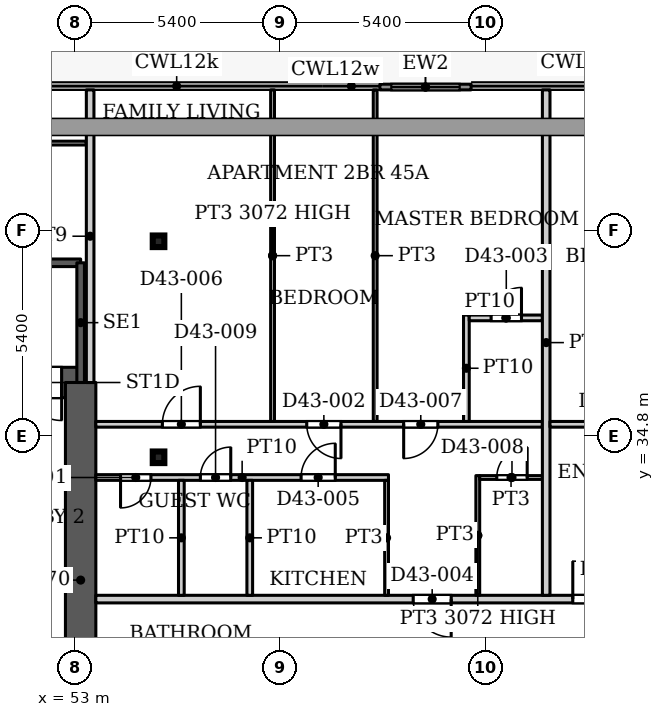
"""IFC4 building model, lengths in metres.
Left out: names, types, materials, properties, quantities, classifications, styles, units other than length and angle.
Written with IfcOpenShell. Run it as: python <this file> out.ifc"""

import sys

from ifc_helpers import new_model, si_unit, direction, frame, frame_2d, origin, origin_2d, place, context, subcontext, project, spatial, rectangle, hollow_rectangle, extrude, source, transform, mapped, element, fill, save


model = new_model("IFC4")
c1 = context("Model", 3, precision=1e-05, world=origin(), true_north=direction((0.0, 1.0)))
c2 = subcontext(c1, "Body", "Model", "MODEL_VIEW")
j1 = project(units=[si_unit("LENGTHUNIT", "METRE"), si_unit("PLANEANGLEUNIT", "RADIAN")], contexts=[c1])
p1 = place(None, origin())
s1 = spatial("IfcSite", under=j1, at=p1, CompositionType="ELEMENT")
p2 = place(p1, origin())
s2 = spatial("IfcBuilding", under=s1, at=p2, CompositionType="ELEMENT")
p3 = place(p2, frame((0.0, 0.0, 191.6)))
s3 = spatial("IfcBuildingStorey", under=s2, at=p3, CompositionType="ELEMENT", Elevation=191.6)
for number, where, z_axis, x_axis in (
    (1, (55.2, 34.232, 0.0), (0.0, 0.0, 1.0), (1.0, 0.0, 0.0)),
    (2, (55.2, 39.916, 0.0), (0.0, 0.0, 1.0), (1.0, 0.0, 0.0)),
):
    element("IfcColumn", number, at=place(p3, frame(where, z_axis=z_axis, x_axis=x_axis)), inside=s3, PredefinedType="COLUMN", context=c2, shape_type="SweptSolid", body=[
        extrude(hollow_rectangle(XDim=0.305, YDim=0.305, WallThickness=0.016, InnerFilletRadius=0.016, OuterFilletRadius=0.032, at=origin_2d()), origin(), (0.0, 0.0, 1.0), 3.9),
    ])
p4 = place(p3, frame((34.75, 36.2, 0.0), z_axis=(0.0, 0.0, 1.0), x_axis=(1.0, 0.0, 0.0)))
e3 = element("IfcWall", 3, at=p4, inside=s3, PredefinedType="SHEAR", context=c2, shape_type="SweptSolid", body=[
    extrude(rectangle(XDim=18.4, YDim=0.8, at=frame_2d((9.2, 0.0))), origin(), (0.0, 0.0, 1.0), 3.9),
])
p5 = place(p4, frame((16.9, 0.0, 0.0)))
e4 = element("IfcOpeningElement", 4, at=p5, cuts=e3, PredefinedType="OPENING", context=c2, shape_type="SweptSolid", body=[
    extrude(rectangle(XDim=1.0, YDim=2.2, at=frame_2d((0.5, 1.1))), frame((0.0, 0.41, 0.0), z_axis=(0.0, -1.0, 0.0), x_axis=(1.0, 0.0, 0.0)), (0.0, 0.0, 1.0), 0.82),
])
p6 = place(p3, frame((53.15, 25.8, 0.0), z_axis=(0.0, 0.0, 1.0), x_axis=(0.0, 1.0, 0.0)))
e5 = element("IfcWall", 5, at=p6, inside=s3, PredefinedType="SHEAR", context=c2, shape_type="SweptSolid", body=[
    extrude(rectangle(XDim=10.4, YDim=0.8, at=frame_2d((5.2, 0.0))), origin(), (0.0, 0.0, 1.0), 3.9),
])
p7 = place(p3, frame((61.024, 43.975, 0.0), z_axis=(0.0, 0.0, 1.0), x_axis=(1.0, 0.0, 0.0)))
e6 = element("IfcWall", 6, at=p7, inside=s3, PredefinedType="SOLIDWALL", context=c2, shape_type="SweptSolid", body=[
    extrude(rectangle(XDim=2.4, YDim=0.15, at=frame_2d((1.2, 0.0))), origin(), (0.0, 0.0, 1.0), 3.75),
])
p8 = place(p7, frame((0.3, 0.0, 0.0)))
e7 = element("IfcOpeningElement", 7, at=p8, cuts=e6, PredefinedType="OPENING", context=c2, shape_type="SweptSolid", body=[
    extrude(rectangle(XDim=1.8, YDim=2.4, at=frame_2d((0.9, 1.2))), frame((0.0, 0.085, 0.0), z_axis=(0.0, -1.0, 0.0), x_axis=(1.0, 0.0, 0.0)), (0.0, 0.0, 1.0), 0.17),
])
p9 = place(p3, frame((43.99, 39.35, 0.0), z_axis=(0.0, 0.0, 1.0), x_axis=(1.0, 0.0, 0.0)))
e8 = element("IfcWall", 8, at=p9, inside=s3, PredefinedType="SHEAR", context=c2, shape_type="SweptSolid", body=[
    extrude(rectangle(XDim=9.16, YDim=0.2, at=frame_2d((4.58, 0.0))), origin(), (0.0, 0.0, 1.0), 3.9),
])
p10 = place(p3, frame((53.15, 36.2, 0.0), z_axis=(0.0, 0.0, 1.0), x_axis=(0.0, 1.0, 0.0)))
e9 = element("IfcWall", 9, at=p10, inside=s3, PredefinedType="SHEAR", context=c2, shape_type="SweptSolid", body=[
    extrude(rectangle(XDim=3.15, YDim=0.2, at=frame_2d((1.575, 0.0))), origin(), (0.0, 0.0, 1.0), 3.9),
])
p11 = place(p3, frame((38.399, 42.5, 0.0), z_axis=(0.0, 0.0, 1.0), x_axis=(1.0, 0.0, 0.0)))
e10 = element("IfcWall", 10, at=p11, inside=s3, PredefinedType="PARTITIONING", context=c2, shape_type="SweptSolid", body=[
    extrude(rectangle(XDim=14.901, YDim=0.1, at=frame_2d((7.451, 0.0))), origin(), (0.0, 0.0, 1.0), 3.6),
])
p12 = place(p11, frame((6.801, 0.0, 0.0)))
e11 = element("IfcOpeningElement", 11, at=p12, cuts=e10, PredefinedType="OPENING", context=c2, shape_type="SweptSolid", body=[
    extrude(rectangle(XDim=1.0, YDim=2.1, at=frame_2d((0.5, 1.05))), frame((0.0, 0.06, 0.0), z_axis=(0.0, -1.0, 0.0), x_axis=(1.0, 0.0, 0.0)), (0.0, 0.0, 1.0), 0.12),
])
p13 = place(p3, frame((53.4, 36.199, 0.0), z_axis=(0.0, 0.0, 1.0), x_axis=(0.0, 1.0, 0.0)))
e12 = element("IfcWall", 12, at=p13, inside=s3, PredefinedType="PARTITIONING", context=c2, shape_type="SweptSolid", body=[
    extrude(rectangle(XDim=7.701, YDim=0.2, at=frame_2d((3.851, 0.0))), origin(), (0.0, 0.0, 1.0), 3.6),
])
p14 = place(p3, frame((53.549, 30.5, 0.0), z_axis=(0.0, 0.0, 1.0), x_axis=(1.0, 0.0, 0.0)))
e13 = element("IfcWall", 13, at=p14, inside=s3, PredefinedType="PARTITIONING", context=c2, shape_type="SweptSolid", body=[
    extrude(rectangle(XDim=44.551, YDim=0.2, at=frame_2d((22.275, 0.0))), origin(), (0.0, 0.0, 1.0), 3.6),
])
p15 = place(p14, frame((8.351, 0.0, 0.0)))
e14 = element("IfcOpeningElement", 14, at=p15, cuts=e13, PredefinedType="OPENING", context=c2, shape_type="SweptSolid", body=[
    extrude(rectangle(XDim=1.0, YDim=2.1, at=frame_2d((0.5, 1.05))), frame((0.0, 0.11, 0.0), z_axis=(0.0, -1.0, 0.0), x_axis=(1.0, 0.0, 0.0)), (0.0, 0.0, 1.0), 0.22),
])
p16 = place(p14, frame((12.551, 0.0, 0.0)))
e15 = element("IfcOpeningElement", 15, at=p16, cuts=e13, PredefinedType="OPENING", context=c2, shape_type="SweptSolid", body=[
    extrude(rectangle(XDim=1.0, YDim=2.1, at=frame_2d((0.5, 1.05))), frame((0.0, 0.11, 0.0), z_axis=(0.0, -1.0, 0.0), x_axis=(1.0, 0.0, 0.0)), (0.0, 0.0, 1.0), 0.22),
])
p17 = place(p14, frame((28.751, 0.0, 0.0)))
e16 = element("IfcOpeningElement", 16, at=p17, cuts=e13, PredefinedType="OPENING", context=c2, shape_type="SweptSolid", body=[
    extrude(rectangle(XDim=1.0, YDim=2.1, at=frame_2d((0.5, 1.05))), frame((0.0, 0.11, 0.0), z_axis=(0.0, -1.0, 0.0), x_axis=(1.0, 0.0, 0.0)), (0.0, 0.0, 1.0), 0.22),
])
p18 = place(p14, frame((40.751, 0.0, 0.0)))
e17 = element("IfcOpeningElement", 17, at=p18, cuts=e13, PredefinedType="OPENING", context=c2, shape_type="SweptSolid", body=[
    extrude(rectangle(XDim=1.0, YDim=2.1, at=frame_2d((0.5, 1.05))), frame((0.0, 0.11, 0.0), z_axis=(0.0, -1.0, 0.0), x_axis=(1.0, 0.0, 0.0)), (0.0, 0.0, 1.0), 0.22),
])
p19 = place(p3, frame((53.549, 33.7, 0.0), z_axis=(0.0, 0.0, 1.0), x_axis=(1.0, 0.0, 0.0)))
e18 = element("IfcWall", 18, at=p19, inside=s3, PredefinedType="PARTITIONING", context=c2, shape_type="SweptSolid", body=[
    extrude(rectangle(XDim=7.701, YDim=0.15, at=frame_2d((3.851, 0.0))), origin(), (0.0, 0.0, 1.0), 3.6),
])
p20 = place(p19, frame((0.651, 0.0, 0.0)))
e19 = element("IfcOpeningElement", 19, at=p20, cuts=e18, PredefinedType="OPENING", context=c2, shape_type="SweptSolid", body=[
    extrude(rectangle(XDim=0.8, YDim=2.1, at=frame_2d((0.4, 1.05))), frame((0.0, 0.085, 0.0), z_axis=(0.0, -1.0, 0.0), x_axis=(1.0, 0.0, 0.0)), (0.0, 0.0, 1.0), 0.17),
])
p21 = place(p19, frame((5.401, 0.0, 0.0)))
e20 = element("IfcOpeningElement", 20, at=p21, cuts=e18, PredefinedType="OPENING", context=c2, shape_type="SweptSolid", body=[
    extrude(rectangle(XDim=0.9, YDim=2.1, at=frame_2d((0.45, 1.05))), frame((0.0, 0.085, 0.0), z_axis=(0.0, -1.0, 0.0), x_axis=(1.0, 0.0, 0.0)), (0.0, 0.0, 1.0), 0.17),
])
p22 = place(p19, frame((2.751, 0.0, 0.0)))
e21 = element("IfcOpeningElement", 21, at=p22, cuts=e18, PredefinedType="OPENING", context=c2, shape_type="SweptSolid", body=[
    extrude(rectangle(XDim=0.8, YDim=2.1, at=frame_2d((0.4, 1.05))), frame((0.0, 0.085, 0.0), z_axis=(0.0, -1.0, 0.0), x_axis=(1.0, 0.0, 0.0)), (0.0, 0.0, 1.0), 0.17),
])
p23 = place(p3, frame((53.549, 35.1, 0.0), z_axis=(0.0, 0.0, 1.0), x_axis=(1.0, 0.0, 0.0)))
e22 = element("IfcWall", 22, at=p23, inside=s3, PredefinedType="PARTITIONING", context=c2, shape_type="SweptSolid", body=[
    extrude(rectangle(XDim=11.751, YDim=0.15, at=frame_2d((5.875, 0.0))), origin(), (0.0, 0.0, 1.0), 3.6),
])
p24 = place(p23, frame((5.551, 0.0, 0.0)))
e23 = element("IfcOpeningElement", 23, at=p24, cuts=e22, PredefinedType="OPENING", context=c2, shape_type="SweptSolid", body=[
    extrude(rectangle(XDim=0.9, YDim=2.1, at=frame_2d((0.45, 1.05))), frame((0.0, 0.085, 0.0), z_axis=(0.0, -1.0, 0.0), x_axis=(1.0, 0.0, 0.0)), (0.0, 0.0, 1.0), 0.17),
])
p25 = place(p23, frame((1.751, 0.0, 0.0)))
e24 = element("IfcOpeningElement", 24, at=p25, cuts=e22, PredefinedType="OPENING", context=c2, shape_type="SweptSolid", body=[
    extrude(rectangle(XDim=1.0, YDim=2.1, at=frame_2d((0.5, 1.05))), frame((0.0, 0.085, 0.0), z_axis=(0.0, -1.0, 0.0), x_axis=(1.0, 0.0, 0.0)), (0.0, 0.0, 1.0), 0.17),
])
p26 = place(p23, frame((8.101, 0.0, 0.0)))
e25 = element("IfcOpeningElement", 25, at=p26, cuts=e22, PredefinedType="OPENING", context=c2, shape_type="SweptSolid", body=[
    extrude(rectangle(XDim=0.9, YDim=2.1, at=frame_2d((0.45, 1.05))), frame((0.0, 0.085, 0.0), z_axis=(0.0, -1.0, 0.0), x_axis=(1.0, 0.0, 0.0)), (0.0, 0.0, 1.0), 0.17),
])
for number, where, z_axis, x_axis in (
    (26, (55.8, 30.6, 0.0), (0.0, 0.0, 1.0), (0.0, 1.0, 0.0)),
    (27, (57.6, 30.6, 0.0), (0.0, 0.0, 1.0), (0.0, 1.0, 0.0)),
):
    element("IfcWall", number, at=place(p3, frame(where, z_axis=z_axis, x_axis=x_axis)), inside=s3, PredefinedType="PARTITIONING", context=c2, shape_type="SweptSolid", body=[
        extrude(rectangle(XDim=3.025, YDim=0.15, at=frame_2d((1.512, 0.0))), origin(), (0.0, 0.0, 1.0), 3.6),
    ])
p27 = place(p3, frame((58.2, 35.175, 0.0), z_axis=(0.0, 0.0, 1.0), x_axis=(0.0, 1.0, 0.0)))
e28 = element("IfcWall", 28, at=p27, inside=s3, PredefinedType="PARTITIONING", context=c2, shape_type="SweptSolid", body=[
    extrude(rectangle(XDim=8.725, YDim=0.1, at=frame_2d((4.362, 0.0))), origin(), (0.0, 0.0, 1.0), 3.072),
])
p28 = place(p3, frame((60.9, 35.175, 0.0), z_axis=(0.0, 0.0, 1.0), x_axis=(0.0, 1.0, 0.0)))
e29 = element("IfcWall", 29, at=p28, inside=s3, PredefinedType="PARTITIONING", context=c2, shape_type="SweptSolid", body=[
    extrude(rectangle(XDim=8.725, YDim=0.1, at=frame_2d((4.362, 0.0))), origin(), (0.0, 0.0, 1.0), 3.6),
])
p29 = place(p3, frame((61.2, 30.6, 0.0), z_axis=(0.0, 0.0, 1.0), x_axis=(0.0, 1.0, 0.0)))
e30 = element("IfcWall", 30, at=p29, inside=s3, PredefinedType="PARTITIONING", context=c2, shape_type="SweptSolid", body=[
    extrude(rectangle(XDim=3.025, YDim=0.1, at=frame_2d((1.512, 0.0))), origin(), (0.0, 0.0, 1.0), 3.6),
])
p30 = place(p3, frame((63.3, 35.175, 0.0), z_axis=(0.0, 0.0, 1.0), x_axis=(0.0, 1.0, 0.0)))
e31 = element("IfcWall", 31, at=p30, inside=s3, PredefinedType="PARTITIONING", context=c2, shape_type="SweptSolid", body=[
    extrude(rectangle(XDim=2.8, YDim=0.15, at=frame_2d((1.4, 0.0))), origin(), (0.0, 0.0, 1.0), 3.6),
])
p31 = place(p3, frame((63.375, 37.9, 0.0), z_axis=(0.0, 0.0, 1.0), x_axis=(1.0, 0.0, 0.0)))
e32 = element("IfcWall", 32, at=p31, inside=s3, PredefinedType="PARTITIONING", context=c2, shape_type="SweptSolid", body=[
    extrude(rectangle(XDim=1.925, YDim=0.15, at=frame_2d((0.962, 0.0))), origin(), (0.0, 0.0, 1.0), 3.6),
])
p32 = place(p31, frame((0.575, 0.0, 0.0)))
e33 = element("IfcOpeningElement", 33, at=p32, cuts=e32, PredefinedType="OPENING", context=c2, shape_type="SweptSolid", body=[
    extrude(rectangle(XDim=0.8, YDim=2.1, at=frame_2d((0.4, 1.05))), frame((0.0, 0.085, 0.0), z_axis=(0.0, -1.0, 0.0), x_axis=(1.0, 0.0, 0.0)), (0.0, 0.0, 1.0), 0.17),
])
p33 = place(p3, frame((63.6, 30.6, 0.0), z_axis=(0.0, 0.0, 1.0), x_axis=(0.0, 1.0, 0.0)))
e34 = element("IfcWall", 34, at=p33, inside=s3, PredefinedType="PARTITIONING", context=c2, shape_type="SweptSolid", body=[
    extrude(rectangle(XDim=3.15, YDim=0.1, at=frame_2d((1.575, 0.0))), origin(), (0.0, 0.0, 1.0), 3.072),
])
p34 = place(p3, frame((63.65, 33.7, 0.0), z_axis=(0.0, 0.0, 1.0), x_axis=(1.0, 0.0, 0.0)))
e35 = element("IfcWall", 35, at=p34, inside=s3, PredefinedType="PARTITIONING", context=c2, shape_type="SweptSolid", body=[
    extrude(rectangle(XDim=1.65, YDim=0.1, at=frame_2d((0.825, 0.0))), origin(), (0.0, 0.0, 1.0), 3.6),
])
p35 = place(p34, frame((0.45, 0.0, 0.0)))
e36 = element("IfcOpeningElement", 36, at=p35, cuts=e35, PredefinedType="OPENING", context=c2, shape_type="SweptSolid", body=[
    extrude(rectangle(XDim=0.8, YDim=2.1, at=frame_2d((0.4, 1.05))), frame((0.0, 0.06, 0.0), z_axis=(0.0, -1.0, 0.0), x_axis=(1.0, 0.0, 0.0)), (0.0, 0.0, 1.0), 0.12),
])
p36 = place(p3, frame((65.4, 30.6, 0.0), z_axis=(0.0, 0.0, 1.0), x_axis=(0.0, 1.0, 0.0)))
e37 = element("IfcWall", 37, at=p36, inside=s3, PredefinedType="PARTITIONING", context=c2, shape_type="SweptSolid", body=[
    extrude(rectangle(XDim=13.3, YDim=0.2, at=frame_2d((6.65, 0.0))), origin(), (0.0, 0.0, 1.0), 3.6),
])
p37 = place(p3, frame((65.5, 35.1, 0.0), z_axis=(0.0, 0.0, 1.0), x_axis=(1.0, 0.0, 0.0)))
e38 = element("IfcWall", 38, at=p37, inside=s3, PredefinedType="PARTITIONING", context=c2, shape_type="SweptSolid", body=[
    extrude(rectangle(XDim=13.3, YDim=0.15, at=frame_2d((6.65, 0.0))), origin(), (0.0, 0.0, 1.0), 3.6),
])
p38 = place(p37, frame((1.4, 0.0, 0.0)))
e39 = element("IfcOpeningElement", 39, at=p38, cuts=e38, PredefinedType="OPENING", context=c2, shape_type="SweptSolid", body=[
    extrude(rectangle(XDim=0.9, YDim=2.1, at=frame_2d((0.45, 1.05))), frame((0.0, 0.085, 0.0), z_axis=(0.0, -1.0, 0.0), x_axis=(1.0, 0.0, 0.0)), (0.0, 0.0, 1.0), 0.17),
])
p39 = place(p37, frame((10.5, 0.0, 0.0)))
e40 = element("IfcOpeningElement", 40, at=p39, cuts=e38, PredefinedType="OPENING", context=c2, shape_type="SweptSolid", body=[
    extrude(rectangle(XDim=1.0, YDim=2.1, at=frame_2d((0.5, 1.05))), frame((0.0, 0.085, 0.0), z_axis=(0.0, -1.0, 0.0), x_axis=(1.0, 0.0, 0.0)), (0.0, 0.0, 1.0), 0.17),
])
p40 = place(p37, frame((6.8, 0.0, 0.0)))
e41 = element("IfcOpeningElement", 41, at=p40, cuts=e38, PredefinedType="OPENING", context=c2, shape_type="SweptSolid", body=[
    extrude(rectangle(XDim=0.9, YDim=2.1, at=frame_2d((0.45, 1.05))), frame((0.0, 0.085, 0.0), z_axis=(0.0, -1.0, 0.0), x_axis=(1.0, 0.0, 0.0)), (0.0, 0.0, 1.0), 0.17),
])
m1 = source(origin(), c2, "Body", "SweptSolid", [
    extrude(rectangle(XDim=1.8, YDim=2.4, at=frame_2d((0.9, 1.2))), frame((0.0, 0.025, 0.0), z_axis=(0.0, -1.0, 0.0), x_axis=(1.0, 0.0, 0.0)), (0.0, 0.0, 1.0), 0.05),
])
p41 = place(p8, origin())
e42 = element("IfcDoor", 42, at=p41, inside=s3, OperationType="SLIDING_TO_LEFT", PredefinedType="DOOR", context=c2, shape_type="MappedRepresentation", body=[
    mapped(m1, transform((0.0, 0.0, 0.0), x_axis=(1.0, 0.0, 0.0), y_axis=(0.0, 1.0, 0.0), z_axis=(0.0, 0.0, 1.0), scale=1.0)),
])
fill(e7, e42)
m2 = source(origin(), c2, "Body", "SweptSolid", [
    extrude(rectangle(XDim=1.0, YDim=2.2, at=frame_2d((0.5, 1.1))), frame((0.0, 0.025, 0.0), z_axis=(0.0, -1.0, 0.0), x_axis=(1.0, 0.0, 0.0)), (0.0, 0.0, 1.0), 0.05),
])
p42 = place(p5, origin())
e43 = element("IfcDoor", 43, at=p42, inside=s3, OperationType="SINGLE_SWING_RIGHT", PredefinedType="DOOR", context=c2, shape_type="MappedRepresentation", body=[
    mapped(m2, transform((0.0, 0.0, 0.0), x_axis=(1.0, 0.0, 0.0), y_axis=(0.0, 1.0, 0.0), z_axis=(0.0, 0.0, 1.0), scale=1.0)),
])
fill(e4, e43)
m3 = source(origin(), c2, "Body", "SweptSolid", [
    extrude(rectangle(XDim=0.8, YDim=2.1, at=frame_2d((0.4, 1.05))), frame((0.0, 0.025, 0.0), z_axis=(0.0, -1.0, 0.0), x_axis=(1.0, 0.0, 0.0)), (0.0, 0.0, 1.0), 0.05),
])
p43 = place(p20, origin())
e44 = element("IfcDoor", 44, at=p43, inside=s3, OperationType="SINGLE_SWING_RIGHT", PredefinedType="DOOR", context=c2, shape_type="MappedRepresentation", body=[
    mapped(m3, transform((0.0, 0.0, 0.0), x_axis=(1.0, 0.0, 0.0), y_axis=(0.0, 1.0, 0.0), z_axis=(0.0, 0.0, 1.0), scale=1.0)),
])
fill(e19, e44)
m4 = source(origin(), c2, "Body", "SweptSolid", [
    extrude(rectangle(XDim=0.9, YDim=2.1, at=frame_2d((0.45, 1.05))), frame((0.0, 0.025, 0.0), z_axis=(0.0, -1.0, 0.0), x_axis=(1.0, 0.0, 0.0)), (0.0, 0.0, 1.0), 0.05),
])
p44 = place(p24, origin())
e45 = element("IfcDoor", 45, at=p44, inside=s3, OperationType="SINGLE_SWING_RIGHT", PredefinedType="DOOR", context=c2, shape_type="MappedRepresentation", body=[
    mapped(m4, transform((0.0, 0.0, 0.0), x_axis=(1.0, 0.0, 0.0), y_axis=(0.0, 1.0, 0.0), z_axis=(0.0, 0.0, 1.0), scale=1.0)),
])
fill(e23, e45)
p45 = place(p32, origin())
e46 = element("IfcDoor", 46, at=p45, inside=s3, OperationType="SINGLE_SWING_LEFT", PredefinedType="DOOR", context=c2, shape_type="MappedRepresentation", body=[
    mapped(m3, transform((0.0, 0.0, 0.0), x_axis=(1.0, 0.0, 0.0), y_axis=(0.0, 1.0, 0.0), z_axis=(0.0, 0.0, 1.0), scale=1.0)),
])
fill(e33, e46)
m5 = source(origin(), c2, "Body", "SweptSolid", [
    extrude(rectangle(XDim=1.0, YDim=2.1, at=frame_2d((0.5, 1.05))), frame((0.0, 0.025, 0.0), z_axis=(0.0, -1.0, 0.0), x_axis=(1.0, 0.0, 0.0)), (0.0, 0.0, 1.0), 0.05),
])
p46 = place(p15, origin())
e47 = element("IfcDoor", 47, at=p46, inside=s3, OperationType="SINGLE_SWING_RIGHT", PredefinedType="DOOR", context=c2, shape_type="MappedRepresentation", body=[
    mapped(m5, transform((0.0, 0.0, 0.0), x_axis=(1.0, 0.0, 0.0), y_axis=(0.0, 1.0, 0.0), z_axis=(0.0, 0.0, 1.0), scale=1.0)),
])
fill(e14, e47)
p47 = place(p21, origin())
e48 = element("IfcDoor", 48, at=p47, inside=s3, OperationType="SINGLE_SWING_LEFT", PredefinedType="DOOR", context=c2, shape_type="MappedRepresentation", body=[
    mapped(m4, transform((0.0, 0.0, 0.0), x_axis=(1.0, 0.0, 0.0), y_axis=(0.0, 1.0, 0.0), z_axis=(0.0, 0.0, 1.0), scale=1.0)),
])
fill(e20, e48)
m6 = source(origin(), c2, "Body", "SweptSolid", [
    extrude(rectangle(XDim=1.0, YDim=2.1, at=frame_2d((0.5, 1.05))), frame((0.0, 0.025, 0.0), z_axis=(0.0, -1.0, 0.0), x_axis=(1.0, 0.0, 0.0)), (0.0, 0.0, 1.0), 0.05),
])
p48 = place(p25, origin())
e49 = element("IfcDoor", 49, at=p48, inside=s3, OperationType="SINGLE_SWING_LEFT", PredefinedType="DOOR", context=c2, shape_type="MappedRepresentation", body=[
    mapped(m6, transform((0.0, 0.0, 0.0), x_axis=(1.0, 0.0, 0.0), y_axis=(0.0, 1.0, 0.0), z_axis=(0.0, 0.0, 1.0), scale=1.0)),
])
fill(e24, e49)
p49 = place(p26, origin())
e50 = element("IfcDoor", 50, at=p49, inside=s3, OperationType="SINGLE_SWING_RIGHT", PredefinedType="DOOR", context=c2, shape_type="MappedRepresentation", body=[
    mapped(m4, transform((0.0, 0.0, 0.0), x_axis=(1.0, 0.0, 0.0), y_axis=(0.0, 1.0, 0.0), z_axis=(0.0, 0.0, 1.0), scale=1.0)),
])
fill(e25, e50)
p50 = place(p35, origin())
e51 = element("IfcDoor", 51, at=p50, inside=s3, OperationType="SINGLE_SWING_LEFT", PredefinedType="DOOR", context=c2, shape_type="MappedRepresentation", body=[
    mapped(m3, transform((0.0, 0.0, 0.0), x_axis=(1.0, 0.0, 0.0), y_axis=(0.0, 1.0, 0.0), z_axis=(0.0, 0.0, 1.0), scale=1.0)),
])
fill(e36, e51)
p51 = place(p22, origin())
e52 = element("IfcDoor", 52, at=p51, inside=s3, OperationType="SINGLE_SWING_LEFT", PredefinedType="DOOR", context=c2, shape_type="MappedRepresentation", body=[
    mapped(m3, transform((0.0, 0.0, 0.0), x_axis=(1.0, 0.0, 0.0), y_axis=(0.0, 1.0, 0.0), z_axis=(0.0, 0.0, 1.0), scale=1.0)),
])
fill(e21, e52)
p52 = place(p16, origin())
e53 = element("IfcDoor", 53, at=p52, inside=s3, OperationType="SINGLE_SWING_LEFT", PredefinedType="DOOR", context=c2, shape_type="MappedRepresentation", body=[
    mapped(m5, transform((0.0, 0.0, 0.0), x_axis=(1.0, 0.0, 0.0), y_axis=(0.0, 1.0, 0.0), z_axis=(0.0, 0.0, 1.0), scale=1.0)),
])
fill(e15, e53)
save(model, sys.argv[1])
